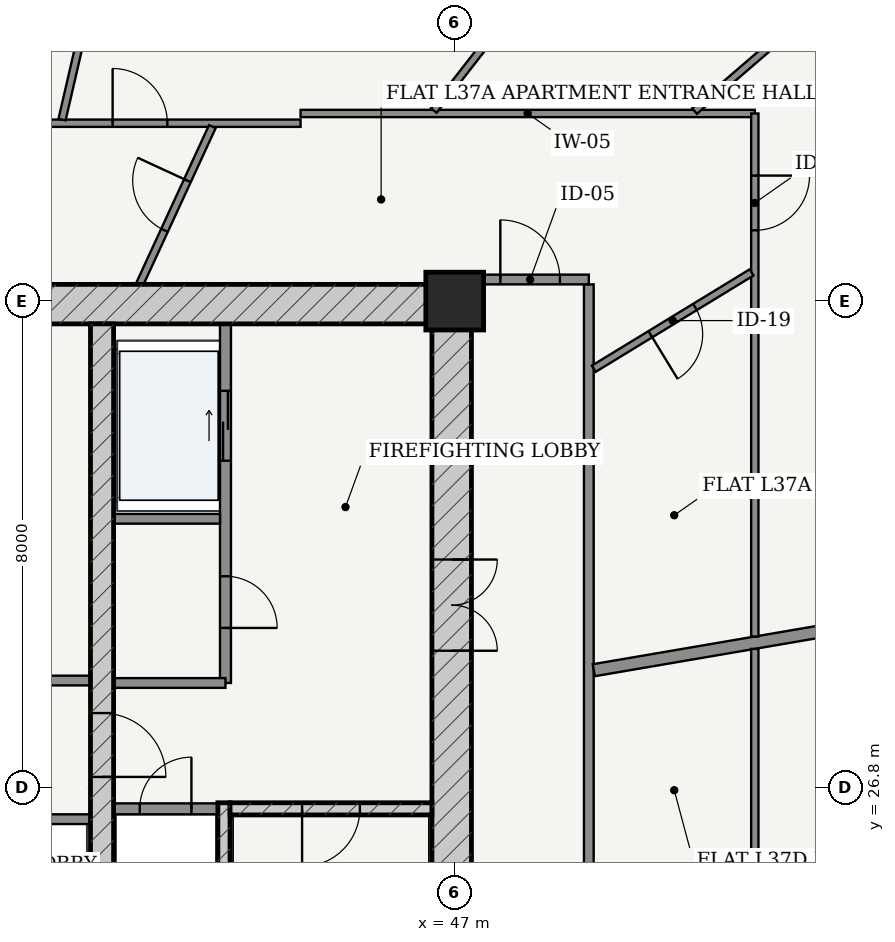
"""IFC4 building model, lengths in metres.
Left out: names, types, materials, properties, quantities, classifications, styles, units other than length and angle.
Written with IfcOpenShell. Run it as: python <this file> out.ifc"""

import sys

from ifc_helpers import new_model, si_unit, direction, frame, frame_2d, origin, origin_2d, place, context, subcontext, project, spatial, rectangle, extrude, source, transform, mapped, element, fill, save


model = new_model("IFC4")
c1 = context("Model", 3, precision=1e-05, world=origin(), true_north=direction((-0.2419218956, 0.970295726276)))
c2 = subcontext(c1, "Body", "Model", "MODEL_VIEW")
j1 = project(units=[si_unit("LENGTHUNIT", "METRE"), si_unit("PLANEANGLEUNIT", "RADIAN")], contexts=[c1])
p1 = place(None, origin())
s1 = spatial("IfcSite", under=j1, at=p1, CompositionType="ELEMENT")
p2 = place(p1, origin())
s2 = spatial("IfcBuilding", under=s1, at=p2, CompositionType="ELEMENT")
p3 = place(p2, frame((0.0, 0.0, 142.6)))
s3 = spatial("IfcBuildingStorey", under=s2, at=p3, CompositionType="ELEMENT", Elevation=142.6)
p4 = place(p3, frame((47.0, 34.8, 0.0), z_axis=(0.0, 0.0, 1.0), x_axis=(1.0, 0.0, 0.0)))
e1 = element("IfcColumn", 1, at=p4, inside=s3, PredefinedType="COLUMN", context=c2, shape_type="SweptSolid", body=[
    extrude(rectangle(XDim=0.95, YDim=0.95, at=origin_2d()), origin(), (0.0, 0.0, 1.0), 3.6),
])
p5 = place(p3, frame((28.725, 34.75, 0.0), z_axis=(0.0, 0.0, 1.0), x_axis=(1.0, 0.0, 0.0)))
e2 = element("IfcWall", 2, at=p5, inside=s3, PredefinedType="SHEAR", context=c2, shape_type="SweptSolid", body=[
    extrude(rectangle(XDim=18.55, YDim=0.65, at=frame_2d((9.275, 0.0))), origin(), (0.0, 0.0, 1.0), 3.33),
])
p6 = place(p3, frame((46.95, 19.175, 0.0), z_axis=(0.0, 0.0, 1.0), x_axis=(0.0, 1.0, 0.0)))
e3 = element("IfcWall", 3, at=p6, inside=s3, PredefinedType="SHEAR", context=c2, shape_type="SweptSolid", body=[
    extrude(rectangle(XDim=15.25, YDim=0.65, at=frame_2d((7.625, 0.0))), origin(), (0.0, 0.0, 1.0), 3.33),
])
p7 = place(p6, frame((9.875, 0.0, 0.0)))
e4 = element("IfcOpeningElement", 4, at=p7, cuts=e3, PredefinedType="OPENING", context=c2, shape_type="SweptSolid", body=[
    extrude(rectangle(XDim=1.5, YDim=2.2, at=frame_2d((0.75, 1.1))), frame((0.0, 0.335, 0.0), z_axis=(0.0, -1.0, 0.0), x_axis=(1.0, 0.0, 0.0)), (0.0, 0.0, 1.0), 0.67),
])
p8 = place(p3, frame((43.205, 19.175, 0.0), z_axis=(0.0, 0.0, 1.0), x_axis=(0.0, 1.0, 0.0)))
e5 = element("IfcWall", 5, at=p8, inside=s3, PredefinedType="SOLIDWALL", context=c2, shape_type="SweptSolid", body=[
    extrude(rectangle(XDim=7.375, YDim=0.2, at=frame_2d((3.688, 0.0))), origin(), (0.0, 0.0, 1.0), 3.33),
])
p9 = place(p3, frame((43.305, 26.45, 0.0), z_axis=(0.0, 0.0, 1.0), x_axis=(1.0, 0.0, 0.0)))
e6 = element("IfcWall", 6, at=p9, inside=s3, PredefinedType="SOLIDWALL", context=c2, shape_type="SweptSolid", body=[
    extrude(rectangle(XDim=3.32, YDim=0.2, at=frame_2d((1.66, 0.0))), origin(), (0.0, 0.0, 1.0), 3.33),
])
p10 = place(p9, frame((1.185, 0.0, 0.0)))
e7 = element("IfcOpeningElement", 7, at=p10, cuts=e6, PredefinedType="OPENING", context=c2, shape_type="SweptSolid", body=[
    extrude(rectangle(XDim=0.95, YDim=2.15, at=frame_2d((0.475, 1.075))), frame((0.0, 0.11, 0.0), z_axis=(0.0, -1.0, 0.0), x_axis=(1.0, 0.0, 0.0)), (0.0, 0.0, 1.0), 0.22),
])
p11 = place(p3, frame((41.2, 19.175, 0.0), z_axis=(0.0, 0.0, 1.0), x_axis=(0.0, 1.0, 0.0)))
e8 = element("IfcWall", 8, at=p11, inside=s3, PredefinedType="SHEAR", context=c2, shape_type="SweptSolid", body=[
    extrude(rectangle(XDim=15.25, YDim=0.38, at=frame_2d((7.625, 0.0))), origin(), (0.0, 0.0, 1.0), 3.33),
])
p12 = place(p11, frame((7.8, 0.0, 0.0)))
e9 = element("IfcOpeningElement", 9, at=p12, cuts=e8, PredefinedType="OPENING", context=c2, shape_type="SweptSolid", body=[
    extrude(rectangle(XDim=1.05, YDim=2.15, at=frame_2d((0.525, 1.075))), frame((0.0, 0.2, 0.0), z_axis=(0.0, -1.0, 0.0), x_axis=(1.0, 0.0, 0.0)), (0.0, 0.0, 1.0), 0.4),
])
p13 = place(p3, frame((41.39, 26.45, 0.0), z_axis=(0.0, 0.0, 1.0), x_axis=(1.0, 0.0, 0.0)))
e10 = element("IfcWall", 10, at=p13, inside=s3, PredefinedType="PARTITIONING", context=c2, shape_type="SweptSolid", body=[
    extrude(rectangle(XDim=1.71, YDim=0.18, at=frame_2d((0.855, 0.0))), origin(), (0.0, 0.0, 1.0), 3.33),
])
p14 = place(p13, frame((0.43, 0.0, 0.0)))
e11 = element("IfcOpeningElement", 11, at=p14, cuts=e10, PredefinedType="OPENING", context=c2, shape_type="SweptSolid", body=[
    extrude(rectangle(XDim=0.85, YDim=2.1, at=frame_2d((0.425, 1.05))), frame((0.0, 0.1, 0.0), z_axis=(0.0, -1.0, 0.0), x_axis=(1.0, 0.0, 0.0)), (0.0, 0.0, 1.0), 0.2),
])
p15 = place(p3, frame((43.23, 28.52, 0.0), z_axis=(0.0, 0.0, 1.0), x_axis=(0.0, 1.0, 0.0)))
e12 = element("IfcWall", 12, at=p15, inside=s3, PredefinedType="PARTITIONING", context=c2, shape_type="SweptSolid", body=[
    extrude(rectangle(XDim=5.905, YDim=0.18, at=frame_2d((2.953, 0.0))), origin(), (0.0, 0.0, 1.0), 3.33),
])
p16 = place(p15, frame((0.905, 0.0, 0.0)))
e13 = element("IfcOpeningElement", 13, at=p16, cuts=e12, PredefinedType="OPENING", context=c2, shape_type="SweptSolid", body=[
    extrude(rectangle(XDim=0.85, YDim=2.1, at=frame_2d((0.425, 1.05))), frame((0.0, 0.1, 0.0), z_axis=(0.0, -1.0, 0.0), x_axis=(1.0, 0.0, 0.0)), (0.0, 0.0, 1.0), 0.2),
])
p17 = place(p15, frame((3.655, 0.0, 0.0)))
e14 = element("IfcOpeningElement", 14, at=p17, cuts=e12, PredefinedType="OPENING", context=c2, shape_type="SweptSolid", body=[
    extrude(rectangle(XDim=1.15, YDim=2.2, at=frame_2d((0.575, 1.1))), frame((0.0, 0.1, 0.0), z_axis=(0.0, -1.0, 0.0), x_axis=(1.0, 0.0, 0.0)), (0.0, 0.0, 1.0), 0.2),
])
p18 = place(p3, frame((41.39, 31.22, 0.0), z_axis=(0.0, 0.0, 1.0), x_axis=(1.0, 0.0, 0.0)))
e15 = element("IfcWall", 15, at=p18, inside=s3, PredefinedType="PARTITIONING", context=c2, shape_type="SweptSolid", body=[
    extrude(rectangle(XDim=1.75, YDim=0.16, at=frame_2d((0.875, 0.0))), origin(), (0.0, 0.0, 1.0), 3.33),
])
p19 = place(p3, frame((41.39, 28.52, 0.0), z_axis=(0.0, 0.0, 1.0), x_axis=(1.0, 0.0, 0.0)))
e16 = element("IfcWall", 16, at=p19, inside=s3, PredefinedType="PARTITIONING", context=c2, shape_type="SweptSolid", body=[
    extrude(rectangle(XDim=1.84, YDim=0.16, at=frame_2d((0.92, 0.0))), origin(), (0.0, 0.0, 1.0), 3.33),
])
p20 = place(p3, frame((34.99, 28.56, 0.0), z_axis=(0.0, 0.0, 1.0), x_axis=(1.0, 0.0, 0.0)))
e17 = element("IfcWall", 17, at=p20, inside=s3, PredefinedType="PARTITIONING", context=c2, shape_type="SweptSolid", body=[
    extrude(rectangle(XDim=6.02, YDim=0.16, at=frame_2d((3.01, 0.0))), origin(), (0.0, 0.0, 1.0), 3.33),
])
p21 = place(p20, frame((1.025, 0.0, 0.0)))
e18 = element("IfcOpeningElement", 18, at=p21, cuts=e17, PredefinedType="OPENING", context=c2, shape_type="SweptSolid", body=[
    extrude(rectangle(XDim=0.86, YDim=2.1, at=frame_2d((0.43, 1.05))), frame((0.0, 0.09, 0.0), z_axis=(0.0, -1.0, 0.0), x_axis=(1.0, 0.0, 0.0)), (0.0, 0.0, 1.0), 0.18),
])
p22 = place(p20, frame((4.14, 0.0, 0.0)))
e19 = element("IfcOpeningElement", 19, at=p22, cuts=e17, PredefinedType="OPENING", context=c2, shape_type="SweptSolid", body=[
    extrude(rectangle(XDim=0.85, YDim=2.1, at=frame_2d((0.425, 1.05))), frame((0.0, 0.09, 0.0), z_axis=(0.0, -1.0, 0.0), x_axis=(1.0, 0.0, 0.0)), (0.0, 0.0, 1.0), 0.18),
])
p23 = place(p3, frame((34.99, 26.28, 0.0), z_axis=(0.0, 0.0, 1.0), x_axis=(1.0, 0.0, 0.0)))
e20 = element("IfcWall", 20, at=p23, inside=s3, PredefinedType="PARTITIONING", context=c2, shape_type="SweptSolid", body=[
    extrude(rectangle(XDim=6.02, YDim=0.16, at=frame_2d((3.01, 0.0))), origin(), (0.0, 0.0, 1.0), 3.33),
])
p24 = place(p23, frame((0.225, 0.0, 0.0)))
e21 = element("IfcOpeningElement", 21, at=p24, cuts=e20, PredefinedType="OPENING", context=c2, shape_type="SweptSolid", body=[
    extrude(rectangle(XDim=1.1, YDim=2.2, at=frame_2d((0.55, 1.1))), frame((0.0, 0.09, 0.0), z_axis=(0.0, -1.0, 0.0), x_axis=(1.0, 0.0, 0.0)), (0.0, 0.0, 1.0), 0.18),
])
p25 = place(p23, frame((1.705, 0.0, 0.0)))
e22 = element("IfcOpeningElement", 22, at=p25, cuts=e20, PredefinedType="OPENING", context=c2, shape_type="SweptSolid", body=[
    extrude(rectangle(XDim=1.1, YDim=2.2, at=frame_2d((0.55, 1.1))), frame((0.0, 0.09, 0.0), z_axis=(0.0, -1.0, 0.0), x_axis=(1.0, 0.0, 0.0)), (0.0, 0.0, 1.0), 0.18),
])
p26 = place(p3, frame((49.205, 16.675, 0.0), z_axis=(0.0, 0.0, 1.0), x_axis=(0.0, 1.0, 0.0)))
e23 = element("IfcWall", 23, at=p26, inside=s3, PredefinedType="PARTITIONING", context=c2, shape_type="SweptSolid", body=[
    extrude(rectangle(XDim=18.4, YDim=0.16, at=frame_2d((9.2, 0.0))), origin(), (0.0, 0.0, 1.0), 2.776),
])
p27 = place(p3, frame((47.275, 35.155, 0.0), z_axis=(0.0, 0.0, 1.0), x_axis=(1.0, 0.0, 0.0)))
e24 = element("IfcWall", 24, at=p27, inside=s3, PredefinedType="PARTITIONING", context=c2, shape_type="SweptSolid", body=[
    extrude(rectangle(XDim=1.93, YDim=0.16, at=frame_2d((0.965, 0.0))), origin(), (0.0, 0.0, 1.0), 2.776),
])
p28 = place(p27, frame((0.475, 0.0, 0.0)))
e25 = element("IfcOpeningElement", 25, at=p28, cuts=e24, PredefinedType="OPENING", context=c2, shape_type="SweptSolid", body=[
    extrude(rectangle(XDim=0.98, YDim=2.2, at=frame_2d((0.49, 1.1))), frame((0.0, 0.09, 0.0), z_axis=(0.0, -1.0, 0.0), x_axis=(1.0, 0.0, 0.0)), (0.0, 0.0, 1.0), 0.18),
])
p29 = place(p3, frame((49.287, 28.73, 0.0), z_axis=(0.0, 0.0, 1.0), x_axis=(0.985698993845, 0.168515558725, 0.0)))
e26 = element("IfcWall", 26, at=p29, inside=s3, PredefinedType="PARTITIONING", context=c2, shape_type="SweptSolid", body=[
    extrude(rectangle(XDim=12.517, YDim=0.2, at=frame_2d((6.259, 0.0))), origin(), (0.0, 0.0, 1.0), 2.776),
])
p30 = place(p3, frame((38.102, 37.725, 0.0), z_axis=(0.0, 0.0, 1.0), x_axis=(1.0, 0.0, 0.0)))
e27 = element("IfcWall", 27, at=p30, inside=s3, PredefinedType="PARTITIONING", context=c2, shape_type="SweptSolid", body=[
    extrude(rectangle(XDim=6.363, YDim=0.12, at=frame_2d((3.182, 0.0))), origin(), (0.0, 0.0, 1.0), 2.776),
])
p31 = place(p30, frame((3.272, 0.0, 0.0)))
e28 = element("IfcOpeningElement", 28, at=p31, cuts=e27, PredefinedType="OPENING", context=c2, shape_type="SweptSolid", body=[
    extrude(rectangle(XDim=0.9, YDim=2.15, at=frame_2d((0.45, 1.075))), frame((0.0, 0.07, 0.0), z_axis=(0.0, -1.0, 0.0), x_axis=(1.0, 0.0, 0.0)), (0.0, 0.0, 1.0), 0.14),
])
p32 = place(p3, frame((44.465, 37.885, 0.0), z_axis=(0.0, 0.0, 1.0), x_axis=(1.0, 0.0, 0.0)))
e29 = element("IfcWall", 29, at=p32, inside=s3, PredefinedType="PARTITIONING", context=c2, shape_type="SweptSolid", body=[
    extrude(rectangle(XDim=7.47, YDim=0.12, at=frame_2d((3.735, 0.0))), origin(), (0.0, 0.0, 1.0), 2.776),
])
p33 = place(p3, frame((51.935, 37.885, 0.0), z_axis=(0.0, 0.0, 1.0), x_axis=(0.0, -1.0, 0.0)))
e30 = element("IfcWall", 30, at=p33, inside=s3, PredefinedType="PARTITIONING", context=c2, shape_type="SweptSolid", body=[
    extrude(rectangle(XDim=8.601, YDim=0.12, at=frame_2d((4.3, 0.0))), origin(), (0.0, 0.0, 1.0), 2.776),
])
p34 = place(p33, frame((1.021, 0.0, 0.0)))
e31 = element("IfcOpeningElement", 31, at=p34, cuts=e30, PredefinedType="OPENING", context=c2, shape_type="SweptSolid", body=[
    extrude(rectangle(XDim=0.9, YDim=2.15, at=frame_2d((0.45, 1.075))), frame((0.0, 0.07, 0.0), z_axis=(0.0, -1.0, 0.0), x_axis=(1.0, 0.0, 0.0)), (0.0, 0.0, 1.0), 0.14),
])
p35 = place(p3, frame((50.944, 37.925, 0.0), z_axis=(0.0, 0.0, 1.0), x_axis=(0.758354915574, 0.65184186888, 0.0)))
e32 = element("IfcWall", 32, at=p35, inside=s3, PredefinedType="PARTITIONING", context=c2, shape_type="SweptSolid", body=[
    extrude(rectangle(XDim=5.432, YDim=0.12, at=frame_2d((2.716, 0.0))), origin(), (0.0, 0.0, 1.0), 2.846),
])
p36 = place(p3, frame((46.656, 37.934, 0.0), z_axis=(0.0, 0.0, 1.0), x_axis=(0.613758289074, 0.789493991487, 0.0)))
e33 = element("IfcWall", 33, at=p36, inside=s3, PredefinedType="PARTITIONING", context=c2, shape_type="SweptSolid", body=[
    extrude(rectangle(XDim=7.695, YDim=0.12, at=frame_2d((3.848, 0.0))), origin(), (0.0, 0.0, 1.0), 2.776),
])
p37 = place(p36, frame((2.395, 0.0, 0.0)))
e34 = element("IfcOpeningElement", 34, at=p37, cuts=e33, PredefinedType="OPENING", context=c2, shape_type="SweptSolid", body=[
    extrude(rectangle(XDim=0.9, YDim=2.15, at=frame_2d((0.45, 1.075))), frame((0.0, 0.07, 0.0), z_axis=(0.0, -1.0, 0.0), x_axis=(1.0, 0.0, 0.0)), (0.0, 0.0, 1.0), 0.14),
])
p38 = place(p3, frame((40.542, 37.785, 0.0), z_axis=(0.0, 0.0, 1.0), x_axis=(0.225467545633, 0.974250679171, 0.0)))
e35 = element("IfcWall", 35, at=p38, inside=s3, PredefinedType="PARTITIONING", context=c2, shape_type="SweptSolid", body=[
    extrude(rectangle(XDim=9.559, YDim=0.12, at=frame_2d((4.78, 0.0))), origin(), (0.0, 0.0, 1.0), 2.776),
])
p39 = place(p38, frame((3.32, 0.0, 0.0)))
e36 = element("IfcOpeningElement", 36, at=p39, cuts=e35, PredefinedType="OPENING", context=c2, shape_type="SweptSolid", body=[
    extrude(rectangle(XDim=0.9, YDim=2.15, at=frame_2d((0.45, 1.075))), frame((0.0, 0.07, 0.0), z_axis=(0.0, -1.0, 0.0), x_axis=(1.0, 0.0, 0.0)), (0.0, 0.0, 1.0), 0.14),
])
p40 = place(p3, frame((49.287, 33.688, 0.0), z_axis=(0.0, 0.0, 1.0), x_axis=(0.853628993111, 0.520881504874, 0.0)))
e37 = element("IfcWall", 37, at=p40, inside=s3, PredefinedType="PARTITIONING", context=c2, shape_type="SweptSolid", body=[
    extrude(rectangle(XDim=3.041, YDim=0.12, at=frame_2d((1.52, 0.0))), origin(), (0.0, 0.0, 1.0), 3.005),
])
p41 = place(p40, frame((1.09, 0.0, 0.0)))
e38 = element("IfcOpeningElement", 38, at=p41, cuts=e37, PredefinedType="OPENING", context=c2, shape_type="SweptSolid", body=[
    extrude(rectangle(XDim=0.86, YDim=2.15, at=frame_2d((0.43, 1.075))), frame((0.0, 0.07, 0.0), z_axis=(0.0, -1.0, 0.0), x_axis=(1.0, 0.0, 0.0)), (0.0, 0.0, 1.0), 0.14),
])
p42 = place(p3, frame((41.817, 35.075, 0.0), z_axis=(0.0, 0.0, 1.0), x_axis=(0.418890148101, 0.908036917655, 0.0)))
e39 = element("IfcWall", 39, at=p42, inside=s3, PredefinedType="PARTITIONING", context=c2, shape_type="SweptSolid", body=[
    extrude(rectangle(XDim=2.856, YDim=0.12, at=frame_2d((1.428, 0.0))), origin(), (0.0, 0.0, 1.0), 3.33),
])
p43 = place(p42, frame((0.978, 0.0, 0.0)))
e40 = element("IfcOpeningElement", 40, at=p43, cuts=e39, PredefinedType="OPENING", context=c2, shape_type="SweptSolid", body=[
    extrude(rectangle(XDim=0.9, YDim=2.15, at=frame_2d((0.45, 1.075))), frame((0.0, 0.07, 0.0), z_axis=(0.0, -1.0, 0.0), x_axis=(1.0, 0.0, 0.0)), (0.0, 0.0, 1.0), 0.14),
])
p44 = place(p3, frame((51.935, 29.08, 0.0), z_axis=(0.0, 0.0, 1.0), x_axis=(0.0, -1.0, 0.0)))
e41 = element("IfcWall", 41, at=p44, inside=s3, PredefinedType="PARTITIONING", context=c2, shape_type="SweptSolid", body=[
    extrude(rectangle(XDim=15.215, YDim=0.12, at=frame_2d((7.608, 0.0))), origin(), (0.0, 0.0, 1.0), 2.776),
])
p45 = place(p44, frame((11.859, 0.0, 0.0)))
e42 = element("IfcOpeningElement", 42, at=p45, cuts=e41, PredefinedType="OPENING", context=c2, shape_type="SweptSolid", body=[
    extrude(rectangle(XDim=0.9, YDim=2.15, at=frame_2d((0.45, 1.075))), frame((0.0, 0.07, 0.0), z_axis=(0.0, -1.0, 0.0), x_axis=(1.0, 0.0, 0.0)), (0.0, 0.0, 1.0), 0.14),
])
p46 = place(p44, frame((7.49, 0.0, 0.0)))
e43 = element("IfcOpeningElement", 43, at=p46, cuts=e41, PredefinedType="OPENING", context=c2, shape_type="SweptSolid", body=[
    extrude(rectangle(XDim=0.9, YDim=2.15, at=frame_2d((0.45, 1.075))), frame((0.0, 0.07, 0.0), z_axis=(0.0, -1.0, 0.0), x_axis=(1.0, 0.0, 0.0)), (0.0, 0.0, 1.0), 0.14),
])
m1 = source(origin(), c2, "Body", "SweptSolid", [
    extrude(rectangle(XDim=1.5, YDim=2.2, at=frame_2d((0.75, 1.1))), frame((0.0, 0.025, 0.0), z_axis=(0.0, -1.0, 0.0), x_axis=(1.0, 0.0, 0.0)), (0.0, 0.0, 1.0), 0.05),
])
p47 = place(p7, frame((1.5, 0.0, 0.0), z_axis=(0.0, 0.0, 1.0), x_axis=(-1.0, 0.0, 0.0)))
e44 = element("IfcDoor", 44, at=p47, inside=s3, OperationType="DOUBLE_DOOR_SINGLE_SWING", PredefinedType="DOOR", context=c2, shape_type="MappedRepresentation", body=[
    mapped(m1, transform((0.0, 0.0, 0.0), scale=1.0)),
])
fill(e4, e44)
m2 = source(origin(), c2, "Body", "SweptSolid", [
    extrude(rectangle(XDim=1.05, YDim=2.15, at=frame_2d((0.525, 1.075))), frame((0.0, 0.025, 0.0), z_axis=(0.0, -1.0, 0.0), x_axis=(1.0, 0.0, 0.0)), (0.0, 0.0, 1.0), 0.05),
])
p48 = place(p12, frame((1.05, 0.0, 0.0), z_axis=(0.0, 0.0, 1.0), x_axis=(-1.0, 0.0, 0.0)))
e45 = element("IfcDoor", 45, at=p48, inside=s3, OperationType="SINGLE_SWING_RIGHT", PredefinedType="DOOR", context=c2, shape_type="MappedRepresentation", body=[
    mapped(m2, transform((0.0, 0.0, 0.0), scale=1.0)),
])
fill(e9, e45)
m3 = source(origin(), c2, "Body", "SweptSolid", [
    extrude(rectangle(XDim=0.95, YDim=2.15, at=frame_2d((0.475, 1.075))), frame((0.0, 0.025, 0.0), z_axis=(0.0, -1.0, 0.0), x_axis=(1.0, 0.0, 0.0)), (0.0, 0.0, 1.0), 0.05),
])
p49 = place(p10, frame((0.95, 0.0, 0.0), z_axis=(0.0, 0.0, 1.0), x_axis=(-1.0, 0.0, 0.0)))
e46 = element("IfcDoor", 46, at=p49, inside=s3, OperationType="SINGLE_SWING_RIGHT", PredefinedType="DOOR", context=c2, shape_type="MappedRepresentation", body=[
    mapped(m3, transform((0.0, 0.0, 0.0), scale=1.0)),
])
fill(e7, e46)
m4 = source(origin(), c2, "Body", "SweptSolid", [
    extrude(rectangle(XDim=0.85, YDim=2.1, at=frame_2d((0.425, 1.05))), frame((0.0, 0.025, 0.0), z_axis=(0.0, -1.0, 0.0), x_axis=(1.0, 0.0, 0.0)), (0.0, 0.0, 1.0), 0.05),
])
p50 = place(p14, origin())
e47 = element("IfcDoor", 47, at=p50, inside=s3, OperationType="SINGLE_SWING_RIGHT", PredefinedType="DOOR", context=c2, shape_type="MappedRepresentation", body=[
    mapped(m4, transform((0.0, 0.0, 0.0), scale=1.0)),
])
fill(e11, e47)
p51 = place(p16, frame((0.85, 0.0, 0.0), z_axis=(0.0, 0.0, 1.0), x_axis=(-1.0, 0.0, 0.0)))
e48 = element("IfcDoor", 48, at=p51, inside=s3, OperationType="SINGLE_SWING_RIGHT", PredefinedType="DOOR", context=c2, shape_type="MappedRepresentation", body=[
    mapped(m4, transform((0.0, 0.0, 0.0), scale=1.0)),
])
fill(e13, e48)
m5 = source(origin(), c2, "Body", "SweptSolid", [
    extrude(rectangle(XDim=1.15, YDim=2.2, at=frame_2d((0.575, 1.1))), frame((0.0, 0.025, 0.0), z_axis=(0.0, -1.0, 0.0), x_axis=(1.0, 0.0, 0.0)), (0.0, 0.0, 1.0), 0.05),
])
p52 = place(p17, origin())
e49 = element("IfcDoor", 49, at=p52, inside=s3, OperationType="DOUBLE_DOOR_SLIDING", PredefinedType="DOOR", context=c2, shape_type="MappedRepresentation", body=[
    mapped(m5, transform((0.0, 0.0, 0.0), scale=1.0)),
])
fill(e14, e49)
m6 = source(origin(), c2, "Body", "SweptSolid", [
    extrude(rectangle(XDim=0.98, YDim=2.2, at=frame_2d((0.49, 1.1))), frame((0.0, 0.025, 0.0), z_axis=(0.0, -1.0, 0.0), x_axis=(1.0, 0.0, 0.0)), (0.0, 0.0, 1.0), 0.05),
])
p53 = place(p28, origin())
e50 = element("IfcDoor", 50, at=p53, inside=s3, OperationType="SINGLE_SWING_LEFT", PredefinedType="DOOR", context=c2, shape_type="MappedRepresentation", body=[
    mapped(m6, transform((0.0, 0.0, 0.0), scale=1.0)),
])
fill(e25, e50)
m7 = source(origin(), c2, "Body", "SweptSolid", [
    extrude(rectangle(XDim=0.86, YDim=2.15, at=frame_2d((0.43, 1.075))), frame((0.0, 0.025, 0.0), z_axis=(0.0, -1.0, 0.0), x_axis=(1.0, 0.0, 0.0)), (0.0, 0.0, 1.0), 0.05),
])
p54 = place(p41, frame((0.86, 0.0, 0.0), z_axis=(0.0, 0.0, 1.0), x_axis=(-1.0, 0.0, 0.0)))
e51 = element("IfcDoor", 51, at=p54, inside=s3, OperationType="SINGLE_SWING_RIGHT", PredefinedType="DOOR", context=c2, shape_type="MappedRepresentation", body=[
    mapped(m7, transform((0.0, 0.0, 0.0), scale=1.0)),
])
fill(e38, e51)
m8 = source(origin(), c2, "Body", "SweptSolid", [
    extrude(rectangle(XDim=0.9, YDim=2.15, at=frame_2d((0.45, 1.075))), frame((0.0, 0.025, 0.0), z_axis=(0.0, -1.0, 0.0), x_axis=(1.0, 0.0, 0.0)), (0.0, 0.0, 1.0), 0.05),
])
p55 = place(p34, origin())
e52 = element("IfcDoor", 52, at=p55, inside=s3, OperationType="SINGLE_SWING_LEFT", PredefinedType="DOOR", context=c2, shape_type="MappedRepresentation", body=[
    mapped(m8, transform((0.0, 0.0, 0.0), scale=1.0)),
])
fill(e31, e52)
p56 = place(p43, origin())
e53 = element("IfcDoor", 53, at=p56, inside=s3, OperationType="SINGLE_SWING_RIGHT", PredefinedType="DOOR", context=c2, shape_type="MappedRepresentation", body=[
    mapped(m8, transform((0.0, 0.0, 0.0), scale=1.0)),
])
fill(e40, e53)
p57 = place(p31, origin())
e54 = element("IfcDoor", 54, at=p57, inside=s3, OperationType="SINGLE_SWING_LEFT", PredefinedType="DOOR", context=c2, shape_type="MappedRepresentation", body=[
    mapped(m8, transform((0.0, 0.0, 0.0), scale=1.0)),
])
fill(e28, e54)
save(model, sys.argv[1])
